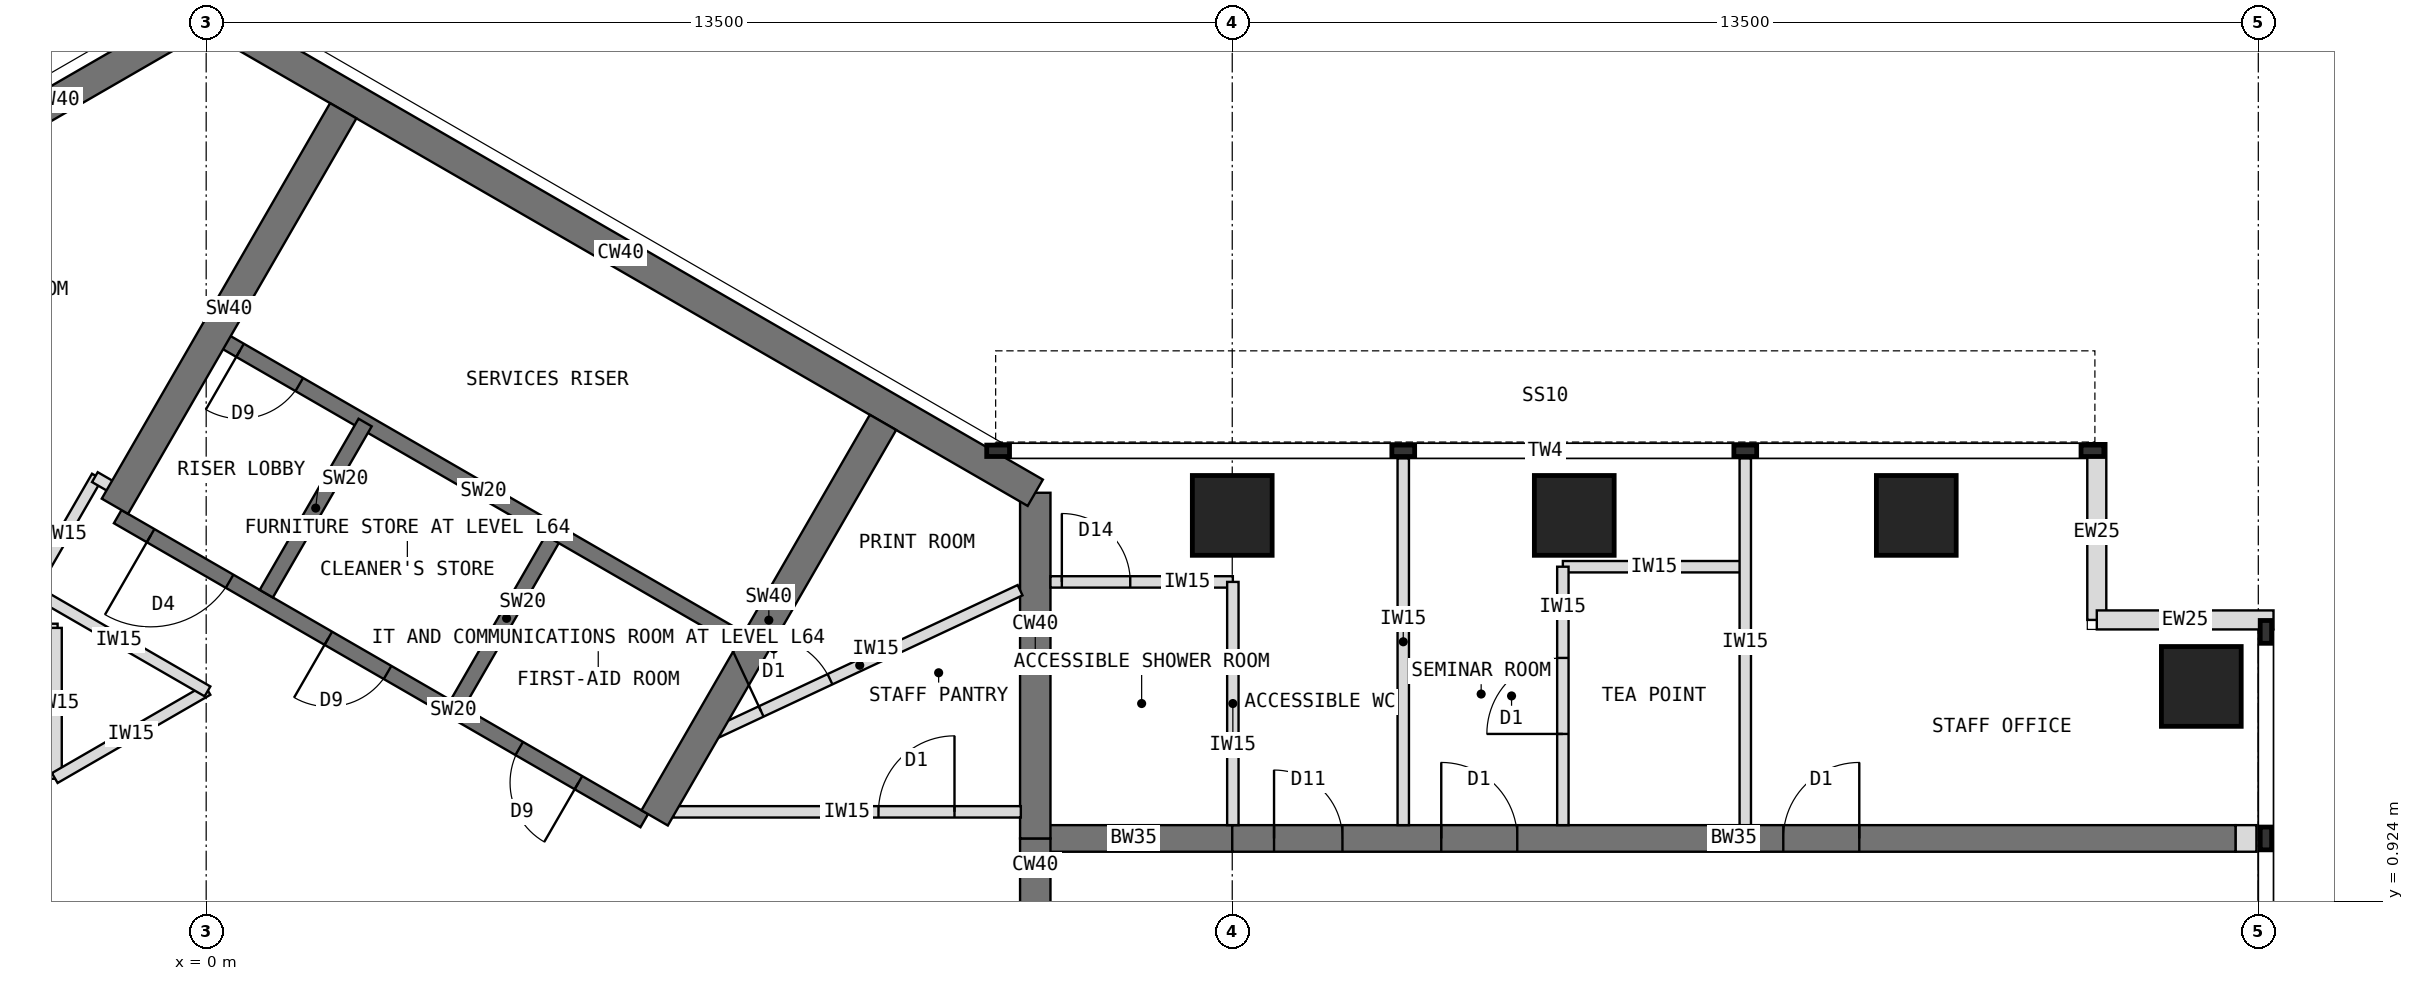
"""IFC4 building model, lengths in metres.
Left out: names, types, materials, properties, quantities, classifications, styles, units other than length and angle.
Written with IfcOpenShell. Run it as: python <this file> out.ifc"""

import sys

from ifc_helpers import new_model, si_unit, direction, frame, frame_2d, origin, origin_2d, place, context, subcontext, project, spatial, rectangle, extrude, element, fill, save


model = new_model("IFC4")
c1 = context("Model", 3, precision=1e-05, world=origin(), true_north=direction((0.0, 1.0)))
c2 = subcontext(c1, "Body", "Model", "MODEL_VIEW")
j1 = project(units=[si_unit("LENGTHUNIT", "METRE"), si_unit("PLANEANGLEUNIT", "RADIAN")], contexts=[c1])
p1 = place(None, origin())
s1 = spatial("IfcSite", under=j1, at=p1, CompositionType="ELEMENT")
p2 = place(p1, origin())
s2 = spatial("IfcBuilding", under=s1, at=p2, CompositionType="ELEMENT")
p3 = place(p2, frame((0.0, 0.0, 259.5)))
s3 = spatial("IfcBuildingStorey", under=s2, at=p3, CompositionType="ELEMENT", Elevation=259.5)
p4 = place(p3, frame((10.908, -1.75, 0.0), z_axis=(0.0, 0.0, 1.0), x_axis=(0.0, 1.0, 0.0)))
e1 = element("IfcWall", 1, at=p4, inside=s3, PredefinedType="SHEAR", context=c2, shape_type="SweptSolid", body=[
    extrude(rectangle(XDim=3.5, YDim=0.4, at=frame_2d((1.75, 0.0))), origin(), (0.0, 0.0, 1.0), 4.0),
])
p5 = place(p4, frame((0.85, 0.0, 0.0)))
e2 = element("IfcOpeningElement", 2, at=p5, cuts=e1, PredefinedType="OPENING", context=c2, shape_type="SweptSolid", body=[
    extrude(rectangle(XDim=1.8, YDim=2.1, at=frame_2d((0.9, 1.05))), frame((0.0, 0.21, 0.0), z_axis=(0.0, -1.0, 0.0), x_axis=(1.0, 0.0, 0.0)), (0.0, 0.0, 1.0), 0.42),
])
p6 = place(p3, frame((10.908, 1.75, 0.0), z_axis=(0.0, 0.0, 1.0), x_axis=(0.0, 1.0, 0.0)))
e3 = element("IfcWall", 3, at=p6, inside=s3, PredefinedType="SHEAR", context=c2, shape_type="SweptSolid", body=[
    extrude(rectangle(XDim=4.548, YDim=0.4, at=frame_2d((2.274, 0.0))), origin(), (0.0, 0.0, 1.0), 4.0),
])
p7 = place(p3, frame((10.908, 6.298, 0.0), z_axis=(0.0, 0.0, 1.0), x_axis=(-0.866021940709, 0.500005998175, 0.0)))
e4 = element("IfcWall", 4, at=p7, inside=s3, PredefinedType="SHEAR", context=c2, shape_type="SweptSolid", body=[
    extrude(rectangle(XDim=12.596, YDim=0.4, at=frame_2d((6.298, 0.0))), origin(), (0.0, 0.0, 1.0), 4.0),
])
p8 = place(p3, frame((0.0, 12.596, 0.0), z_axis=(0.0, 0.0, 1.0), x_axis=(-0.866011268655, -0.500024481964, 0.0)))
e5 = element("IfcWall", 5, at=p8, inside=s3, PredefinedType="SHEAR", context=c2, shape_type="SweptSolid", body=[
    extrude(rectangle(XDim=4.548, YDim=0.4, at=frame_2d((2.274, 0.0))), origin(), (0.0, 0.0, 1.0), 4.0),
])
p9 = place(p3, frame((10.908, 1.75, 0.0), z_axis=(0.0, 0.0, 1.0), x_axis=(1.0, 0.0, 0.0)))
e6 = element("IfcWall", 6, at=p9, inside=s3, PredefinedType="SHEAR", context=c2, shape_type="SweptSolid", body=[
    extrude(rectangle(XDim=2.592, YDim=0.35, at=frame_2d((1.296, 0.0))), origin(), (0.0, 0.0, 1.0), 4.0),
])
p10 = place(p3, frame((13.5, 1.75, 0.0), z_axis=(0.0, 0.0, 1.0), x_axis=(1.0, 0.0, 0.0)))
e7 = element("IfcWall", 7, at=p10, inside=s3, PredefinedType="SHEAR", context=c2, shape_type="SweptSolid", body=[
    extrude(rectangle(XDim=13.2, YDim=0.35, at=frame_2d((6.6, 0.0))), origin(), (0.0, 0.0, 1.0), 4.0),
])
p11 = place(p10, frame((0.55, 0.0, 0.0)))
e8 = element("IfcOpeningElement", 8, at=p11, cuts=e7, PredefinedType="OPENING", context=c2, shape_type="SweptSolid", body=[
    extrude(rectangle(XDim=0.9, YDim=2.1, at=frame_2d((0.45, 1.05))), frame((0.0, 0.185, 0.0), z_axis=(0.0, -1.0, 0.0), x_axis=(1.0, 0.0, 0.0)), (0.0, 0.0, 1.0), 0.37),
])
p12 = place(p10, frame((2.75, 0.0, 0.0)))
e9 = element("IfcOpeningElement", 9, at=p12, cuts=e7, PredefinedType="OPENING", context=c2, shape_type="SweptSolid", body=[
    extrude(rectangle(XDim=1.0, YDim=2.1, at=frame_2d((0.5, 1.05))), frame((0.0, 0.185, 0.0), z_axis=(0.0, -1.0, 0.0), x_axis=(1.0, 0.0, 0.0)), (0.0, 0.0, 1.0), 0.37),
])
p13 = place(p10, frame((7.25, 0.0, 0.0)))
e10 = element("IfcOpeningElement", 10, at=p13, cuts=e7, PredefinedType="OPENING", context=c2, shape_type="SweptSolid", body=[
    extrude(rectangle(XDim=1.0, YDim=2.1, at=frame_2d((0.5, 1.05))), frame((0.0, 0.185, 0.0), z_axis=(0.0, -1.0, 0.0), x_axis=(1.0, 0.0, 0.0)), (0.0, 0.0, 1.0), 0.37),
])
for number, where, z_axis, x_axis in (
    (11, (13.5, 6.0, 0.0), (0.0, 0.0, 1.0), (1.0, 0.0, 0.0)),
    (12, (18.0, 6.0, 0.0), (0.0, 0.0, 1.0), (1.0, 0.0, 0.0)),
    (13, (22.5, 6.0, 0.0), (0.0, 0.0, 1.0), (1.0, 0.0, 0.0)),
    (14, (26.25, 3.75, 0.0), (0.0, 0.0, 1.0), (1.0, 0.0, 0.0)),
):
    element("IfcColumn", number, at=place(p3, frame(where, z_axis=z_axis, x_axis=x_axis)), inside=s3, PredefinedType="COLUMN", context=c2, shape_type="SweptSolid", body=[
        extrude(rectangle(XDim=1.05, YDim=1.05, at=origin_2d()), origin(), (0.0, 0.0, 1.0), 4.0),
    ])
for number, where, z_axis, x_axis in (
    (15, (24.875, 6.95, 0.0), (0.0, 0.0, 1.0), (0.0, -1.0, 0.0)),
    (16, (24.875, 4.625, 0.0), (0.0, 0.0, 1.0), (1.0, 0.0, 0.0)),
):
    element("IfcWall", number, at=place(p3, frame(where, z_axis=z_axis, x_axis=x_axis)), inside=s3, PredefinedType="STANDARD", context=c2, shape_type="SweptSolid", body=[
        extrude(rectangle(XDim=2.325, YDim=0.25, at=frame_2d((1.163, 0.0))), origin(), (0.0, 0.0, 1.0), 3.8),
    ])
p14 = place(p3, frame((26.7, 1.75, 0.0), z_axis=(0.0, 0.0, 1.0), x_axis=(1.0, 0.0, 0.0)))
e17 = element("IfcWall", 17, at=p14, inside=s3, PredefinedType="PARTITIONING", context=c2, shape_type="SweptSolid", body=[
    extrude(rectangle(XDim=0.275, YDim=0.35, at=frame_2d((0.138, 0.0))), origin(), (0.0, 0.0, 1.0), 3.8),
])
p15 = place(p3, frame((5.764, 1.984, 0.0), z_axis=(0.0, 0.0, 1.0), x_axis=(-0.866026010844, 0.49999894854, 0.0)))
e18 = element("IfcWall", 18, at=p15, inside=s3, PredefinedType="SHEAR", context=c2, shape_type="SweptSolid", body=[
    extrude(rectangle(XDim=8.0, YDim=0.2, at=frame_2d((4.0, 0.0))), origin(), (0.0, 0.0, 1.0), 4.0),
])
p16 = place(p15, frame((6.3, 0.0, 0.0)))
e19 = element("IfcOpeningElement", 19, at=p16, cuts=e18, PredefinedType="OPENING", context=c2, shape_type="SweptSolid", body=[
    extrude(rectangle(XDim=1.2, YDim=2.1, at=frame_2d((0.6, 1.05))), frame((0.0, 0.11, 0.0), z_axis=(0.0, -1.0, 0.0), x_axis=(1.0, 0.0, 0.0)), (0.0, 0.0, 1.0), 0.22),
])
p17 = place(p15, frame((1.0, 0.0, 0.0)))
e20 = element("IfcOpeningElement", 20, at=p17, cuts=e18, PredefinedType="OPENING", context=c2, shape_type="SweptSolid", body=[
    extrude(rectangle(XDim=0.9, YDim=2.1, at=frame_2d((0.45, 1.05))), frame((0.0, 0.11, 0.0), z_axis=(0.0, -1.0, 0.0), x_axis=(1.0, 0.0, 0.0)), (0.0, 0.0, 1.0), 0.22),
])
p18 = place(p15, frame((3.9, 0.0, 0.0)))
e21 = element("IfcOpeningElement", 21, at=p18, cuts=e18, PredefinedType="OPENING", context=c2, shape_type="SweptSolid", body=[
    extrude(rectangle(XDim=0.9, YDim=2.1, at=frame_2d((0.45, 1.05))), frame((0.0, 0.11, 0.0), z_axis=(0.0, -1.0, 0.0), x_axis=(1.0, 0.0, 0.0)), (0.0, 0.0, 1.0), 0.22),
])
for number, where, z_axis, x_axis in (
    (22, (3.303, 3.52, 0.0), (0.0, 0.0, 1.0), (0.5, 0.866, 0.0)),
    (23, (0.791, 4.97, 0.0), (0.0, 0.0, 1.0), (0.5, 0.866, 0.0)),
):
    element("IfcWall", number, at=place(p3, frame(where, z_axis=z_axis, x_axis=x_axis)), inside=s3, PredefinedType="SHEAR", context=c2, shape_type="SweptSolid", body=[
        extrude(rectangle(XDim=2.6, YDim=0.2, at=frame_2d((1.3, 0.0))), origin(), (0.0, 0.0, 1.0), 4.0),
    ])
p19 = place(p3, frame((7.114, 4.322, 0.0), z_axis=(0.0, 0.0, 1.0), x_axis=(-0.866026010844, 0.49999894854, 0.0)))
e24 = element("IfcWall", 24, at=p19, inside=s3, PredefinedType="SHEAR", context=c2, shape_type="SweptSolid", body=[
    extrude(rectangle(XDim=8.0, YDim=0.2, at=frame_2d((4.0, 0.0))), origin(), (0.0, 0.0, 1.0), 4.0),
])
p20 = place(p19, frame((6.8, 0.0, 0.0)))
e25 = element("IfcOpeningElement", 25, at=p20, cuts=e24, PredefinedType="OPENING", context=c2, shape_type="SweptSolid", body=[
    extrude(rectangle(XDim=0.9, YDim=2.1, at=frame_2d((0.45, 1.05))), frame((0.0, 0.11, 0.0), z_axis=(0.0, -1.0, 0.0), x_axis=(1.0, 0.0, 0.0)), (0.0, 0.0, 1.0), 0.22),
])
for number, where, z_axis, x_axis in (
    (26, (-1.201, 6.12, 0.0), (0.0, 0.0, 1.0), (0.5, 0.866, 0.0)),
    (27, (5.901, 2.02, 0.0), (0.0, 0.0, 1.0), (0.5, 0.866, 0.0)),
):
    element("IfcWall", number, at=place(p3, frame(where, z_axis=z_axis, x_axis=x_axis)), inside=s3, PredefinedType="SHEAR", context=c2, shape_type="SweptSolid", body=[
        extrude(rectangle(XDim=6.008, YDim=0.4, at=frame_2d((3.004, 0.0))), origin(), (0.0, 0.0, 1.0), 4.0),
    ])
for number, where, z_axis, x_axis in (
    (28, (15.75, 1.925, 0.0), (0.0, 0.0, 1.0), (0.0, 1.0, 0.0)),
    (29, (20.25, 1.925, 0.0), (0.0, 0.0, 1.0), (0.0, 1.0, 0.0)),
):
    element("IfcWall", number, at=place(p3, frame(where, z_axis=z_axis, x_axis=x_axis)), inside=s3, PredefinedType="PARTITIONING", context=c2, shape_type="SweptSolid", body=[
        extrude(rectangle(XDim=4.825, YDim=0.15, at=frame_2d((2.413, 0.0))), origin(), (0.0, 0.0, 1.0), 3.8),
    ])
p21 = place(p3, frame((17.85, 5.325, 0.0), z_axis=(0.0, 0.0, 1.0), x_axis=(1.0, 0.0, 0.0)))
e30 = element("IfcWall", 30, at=p21, inside=s3, PredefinedType="PARTITIONING", context=c2, shape_type="SweptSolid", body=[
    extrude(rectangle(XDim=2.4, YDim=0.15, at=frame_2d((1.2, 0.0))), origin(), (0.0, 0.0, 1.0), 3.8),
])
p22 = place(p3, frame((17.85, 1.925, 0.0), z_axis=(0.0, 0.0, 1.0), x_axis=(0.0, 1.0, 0.0)))
e31 = element("IfcWall", 31, at=p22, inside=s3, PredefinedType="PARTITIONING", context=c2, shape_type="SweptSolid", body=[
    extrude(rectangle(XDim=3.4, YDim=0.15, at=frame_2d((1.7, 0.0))), origin(), (0.0, 0.0, 1.0), 3.8),
])
p23 = place(p22, frame((1.2, 0.0, 0.0)))
e32 = element("IfcOpeningElement", 32, at=p23, cuts=e31, PredefinedType="OPENING", context=c2, shape_type="SweptSolid", body=[
    extrude(rectangle(XDim=1.0, YDim=2.1, at=frame_2d((0.5, 1.05))), frame((0.0, 0.085, 0.0), z_axis=(0.0, -1.0, 0.0), x_axis=(1.0, 0.0, 0.0)), (0.0, 0.0, 1.0), 0.17),
])
p24 = place(p3, frame((11.108, 5.125, 0.0), z_axis=(0.0, 0.0, 1.0), x_axis=(1.0, 0.0, 0.0)))
e33 = element("IfcWall", 33, at=p24, inside=s3, PredefinedType="PARTITIONING", context=c2, shape_type="SweptSolid", body=[
    extrude(rectangle(XDim=2.4, YDim=0.15, at=frame_2d((1.2, 0.0))), origin(), (0.0, 0.0, 1.0), 3.8),
])
p25 = place(p24, frame((0.15, 0.0, 0.0)))
e34 = element("IfcOpeningElement", 34, at=p25, cuts=e33, PredefinedType="OPENING", context=c2, shape_type="SweptSolid", body=[
    extrude(rectangle(XDim=0.9, YDim=2.1, at=frame_2d((0.45, 1.05))), frame((0.0, 0.085, 0.0), z_axis=(0.0, -1.0, 0.0), x_axis=(1.0, 0.0, 0.0)), (0.0, 0.0, 1.0), 0.17),
])
p26 = place(p3, frame((13.508, 1.925, 0.0), z_axis=(0.0, 0.0, 1.0), x_axis=(0.0, 1.0, 0.0)))
e35 = element("IfcWall", 35, at=p26, inside=s3, PredefinedType="PARTITIONING", context=c2, shape_type="SweptSolid", body=[
    extrude(rectangle(XDim=3.2, YDim=0.15, at=frame_2d((1.6, 0.0))), origin(), (0.0, 0.0, 1.0), 3.267),
])
p27 = place(p3, frame((-4.92, 4.5, 0.0), z_axis=(0.0, 0.0, 1.0), x_axis=(1.0, 0.0, 0.0)))
e36 = element("IfcWall", 36, at=p27, inside=s3, PredefinedType="PARTITIONING", context=c2, shape_type="SweptSolid", body=[
    extrude(rectangle(XDim=2.965, YDim=0.15, at=frame_2d((1.482, 0.0))), origin(), (0.0, 0.0, 1.0), 3.8),
])
p28 = place(p27, frame((0.8, 0.0, 0.0)))
e37 = element("IfcOpeningElement", 37, at=p28, cuts=e36, PredefinedType="OPENING", context=c2, shape_type="SweptSolid", body=[
    extrude(rectangle(XDim=1.0, YDim=2.1, at=frame_2d((0.5, 1.05))), frame((0.0, 0.085, 0.0), z_axis=(0.0, -1.0, 0.0), x_axis=(1.0, 0.0, 0.0)), (0.0, 0.0, 1.0), 0.17),
])
p29 = place(p3, frame((-1.975, 4.52, 0.0), z_axis=(0.0, 0.0, 1.0), x_axis=(0.0, -1.0, 0.0)))
e38 = element("IfcWall", 38, at=p29, inside=s3, PredefinedType="PARTITIONING", context=c2, shape_type="SweptSolid", body=[
    extrude(rectangle(XDim=1.985, YDim=0.15, at=frame_2d((0.993, 0.0))), origin(), (0.0, 0.0, 1.0), 3.8),
])
p30 = place(p3, frame((-1.992, 2.545, 0.0), z_axis=(0.0, 0.0, 1.0), x_axis=(0.866059450854, 0.499941024108, 0.0)))
e39 = element("IfcWall", 39, at=p30, inside=s3, PredefinedType="PARTITIONING", context=c2, shape_type="SweptSolid", body=[
    extrude(rectangle(XDim=2.321, YDim=0.15, at=frame_2d((1.16, 0.0))), origin(), (0.0, 0.0, 1.0), 3.8),
])
p31 = place(p3, frame((0.017, 3.685, 0.0), z_axis=(0.0, 0.0, 1.0), x_axis=(-0.866036099759, 0.499981473571, 0.0)))
e40 = element("IfcWall", 40, at=p31, inside=s3, PredefinedType="PARTITIONING", context=c2, shape_type="SweptSolid", body=[
    extrude(rectangle(XDim=2.692, YDim=0.15, at=frame_2d((1.346, 0.0))), origin(), (0.0, 0.0, 1.0), 3.8),
])
p32 = place(p3, frame((-2.307, 5.004, 0.0), z_axis=(0.0, 0.0, 1.0), x_axis=(0.500062521093, 0.865989304205, 0.0)))
e41 = element("IfcWall", 41, at=p32, inside=s3, PredefinedType="PARTITIONING", context=c2, shape_type="SweptSolid", body=[
    extrude(rectangle(XDim=1.74, YDim=0.15, at=frame_2d((0.87, 0.0))), origin(), (0.0, 0.0, 1.0), 3.8),
])
p33 = place(p3, frame((-1.464, 6.503, 0.0), z_axis=(0.0, 0.0, 1.0), x_axis=(0.866138304741, -0.499804398801, 0.0)))
e42 = element("IfcWall", 42, at=p33, inside=s3, PredefinedType="PARTITIONING", context=c2, shape_type="SweptSolid", body=[
    extrude(rectangle(XDim=0.43, YDim=0.15, at=frame_2d((0.215, 0.0))), origin(), (0.0, 0.0, 1.0), 3.8),
])
p34 = place(p3, frame((6.143, 2.1, 0.0), z_axis=(0.0, 0.0, 1.0), x_axis=(1.0, 0.0, 0.0)))
e43 = element("IfcWall", 43, at=p34, inside=s3, PredefinedType="PARTITIONING", context=c2, shape_type="SweptSolid", body=[
    extrude(rectangle(XDim=4.576, YDim=0.15, at=frame_2d((2.288, 0.0))), origin(), (0.0, 0.0, 1.0), 3.8),
])
p35 = place(p34, frame((2.703, 0.0, 0.0)))
e44 = element("IfcOpeningElement", 44, at=p35, cuts=e43, PredefinedType="OPENING", context=c2, shape_type="SweptSolid", body=[
    extrude(rectangle(XDim=1.0, YDim=2.1, at=frame_2d((0.5, 1.05))), frame((0.0, 0.085, 0.0), z_axis=(0.0, -1.0, 0.0), x_axis=(1.0, 0.0, 0.0)), (0.0, 0.0, 1.0), 0.17),
])
p36 = place(p3, frame((6.489, 3.04, 0.0), z_axis=(0.0, 0.0, 1.0), x_axis=(0.905569039007, 0.424198910408, 0.0)))
e45 = element("IfcWall", 45, at=p36, inside=s3, PredefinedType="PARTITIONING", context=c2, shape_type="SweptSolid", body=[
    extrude(rectangle(XDim=4.659, YDim=0.15, at=frame_2d((2.33, 0.0))), origin(), (0.0, 0.0, 1.0), 3.8),
])
p37 = place(p36, frame((0.898, 0.0, 0.0)))
e46 = element("IfcOpeningElement", 46, at=p37, cuts=e45, PredefinedType="OPENING", context=c2, shape_type="SweptSolid", body=[
    extrude(rectangle(XDim=1.0, YDim=2.1, at=frame_2d((0.5, 1.05))), frame((0.0, 0.085, 0.0), z_axis=(0.0, -1.0, 0.0), x_axis=(1.0, 0.0, 0.0)), (0.0, 0.0, 1.0), 0.17),
])
p38 = place(p16, origin())
e47 = element("IfcDoor", 47, at=p38, inside=s3, OperationType="SINGLE_SWING_RIGHT", PredefinedType="DOOR", context=c2, shape_type="SweptSolid", body=[
    extrude(rectangle(XDim=1.2, YDim=2.1, at=frame_2d((0.6, 1.05))), frame((0.0, 0.025, 0.0), z_axis=(0.0, -1.0, 0.0), x_axis=(1.0, 0.0, 0.0)), (0.0, 0.0, 1.0), 0.05),
])
fill(e19, e47)
p39 = place(p20, origin())
e48 = element("IfcDoor", 48, at=p39, inside=s3, OperationType="SINGLE_SWING_RIGHT", PredefinedType="DOOR", context=c2, shape_type="SweptSolid", body=[
    extrude(rectangle(XDim=0.9, YDim=2.1, at=frame_2d((0.45, 1.05))), frame((0.0, 0.025, 0.0), z_axis=(0.0, -1.0, 0.0), x_axis=(1.0, 0.0, 0.0)), (0.0, 0.0, 1.0), 0.05),
])
fill(e25, e48)
p40 = place(p23, origin())
e49 = element("IfcDoor", 49, at=p40, inside=s3, OperationType="SINGLE_SWING_LEFT", PredefinedType="DOOR", context=c2, shape_type="SweptSolid", body=[
    extrude(rectangle(XDim=1.0, YDim=2.1, at=frame_2d((0.5, 1.05))), frame((0.0, 0.025, 0.0), z_axis=(0.0, -1.0, 0.0), x_axis=(1.0, 0.0, 0.0)), (0.0, 0.0, 1.0), 0.05),
])
fill(e32, e49)
p41 = place(p25, origin())
e50 = element("IfcDoor", 50, at=p41, inside=s3, OperationType="SINGLE_SWING_LEFT", PredefinedType="DOOR", context=c2, shape_type="SweptSolid", body=[
    extrude(rectangle(XDim=0.9, YDim=2.1, at=frame_2d((0.45, 1.05))), frame((0.0, 0.025, 0.0), z_axis=(0.0, -1.0, 0.0), x_axis=(1.0, 0.0, 0.0)), (0.0, 0.0, 1.0), 0.05),
])
fill(e34, e50)
p42 = place(p37, origin())
e51 = element("IfcDoor", 51, at=p42, inside=s3, OperationType="SINGLE_SWING_LEFT", PredefinedType="DOOR", context=c2, shape_type="SweptSolid", body=[
    extrude(rectangle(XDim=1.0, YDim=2.1, at=frame_2d((0.5, 1.05))), frame((0.0, 0.025, 0.0), z_axis=(0.0, -1.0, 0.0), x_axis=(1.0, 0.0, 0.0)), (0.0, 0.0, 1.0), 0.05),
])
fill(e46, e51)
p43 = place(p35, origin())
e52 = element("IfcDoor", 52, at=p43, inside=s3, OperationType="SINGLE_SWING_RIGHT", PredefinedType="DOOR", context=c2, shape_type="SweptSolid", body=[
    extrude(rectangle(XDim=1.0, YDim=2.1, at=frame_2d((0.5, 1.05))), frame((0.0, 0.025, 0.0), z_axis=(0.0, -1.0, 0.0), x_axis=(1.0, 0.0, 0.0)), (0.0, 0.0, 1.0), 0.05),
])
fill(e44, e52)
p44 = place(p11, origin())
e53 = element("IfcDoor", 53, at=p44, inside=s3, OperationType="SINGLE_SWING_LEFT", PredefinedType="DOOR", context=c2, shape_type="SweptSolid", body=[
    extrude(rectangle(XDim=0.9, YDim=2.1, at=frame_2d((0.45, 1.05))), frame((0.0, 0.025, 0.0), z_axis=(0.0, -1.0, 0.0), x_axis=(1.0, 0.0, 0.0)), (0.0, 0.0, 1.0), 0.05),
])
fill(e8, e53)
p45 = place(p12, origin())
e54 = element("IfcDoor", 54, at=p45, inside=s3, OperationType="SINGLE_SWING_LEFT", PredefinedType="DOOR", context=c2, shape_type="SweptSolid", body=[
    extrude(rectangle(XDim=1.0, YDim=2.1, at=frame_2d((0.5, 1.05))), frame((0.0, 0.025, 0.0), z_axis=(0.0, -1.0, 0.0), x_axis=(1.0, 0.0, 0.0)), (0.0, 0.0, 1.0), 0.05),
])
fill(e9, e54)
p46 = place(p13, origin())
e55 = element("IfcDoor", 55, at=p46, inside=s3, OperationType="SINGLE_SWING_RIGHT", PredefinedType="DOOR", context=c2, shape_type="SweptSolid", body=[
    extrude(rectangle(XDim=1.0, YDim=2.1, at=frame_2d((0.5, 1.05))), frame((0.0, 0.025, 0.0), z_axis=(0.0, -1.0, 0.0), x_axis=(1.0, 0.0, 0.0)), (0.0, 0.0, 1.0), 0.05),
])
fill(e10, e55)
p47 = place(p17, origin())
e56 = element("IfcDoor", 56, at=p47, inside=s3, OperationType="SINGLE_SWING_LEFT", PredefinedType="DOOR", context=c2, shape_type="SweptSolid", body=[
    extrude(rectangle(XDim=0.9, YDim=2.1, at=frame_2d((0.45, 1.05))), frame((0.0, 0.025, 0.0), z_axis=(0.0, -1.0, 0.0), x_axis=(1.0, 0.0, 0.0)), (0.0, 0.0, 1.0), 0.05),
])
fill(e20, e56)
p48 = place(p18, origin())
e57 = element("IfcDoor", 57, at=p48, inside=s3, OperationType="SINGLE_SWING_RIGHT", PredefinedType="DOOR", context=c2, shape_type="SweptSolid", body=[
    extrude(rectangle(XDim=0.9, YDim=2.1, at=frame_2d((0.45, 1.05))), frame((0.0, 0.025, 0.0), z_axis=(0.0, -1.0, 0.0), x_axis=(1.0, 0.0, 0.0)), (0.0, 0.0, 1.0), 0.05),
])
fill(e21, e57)
save(model, sys.argv[1])
